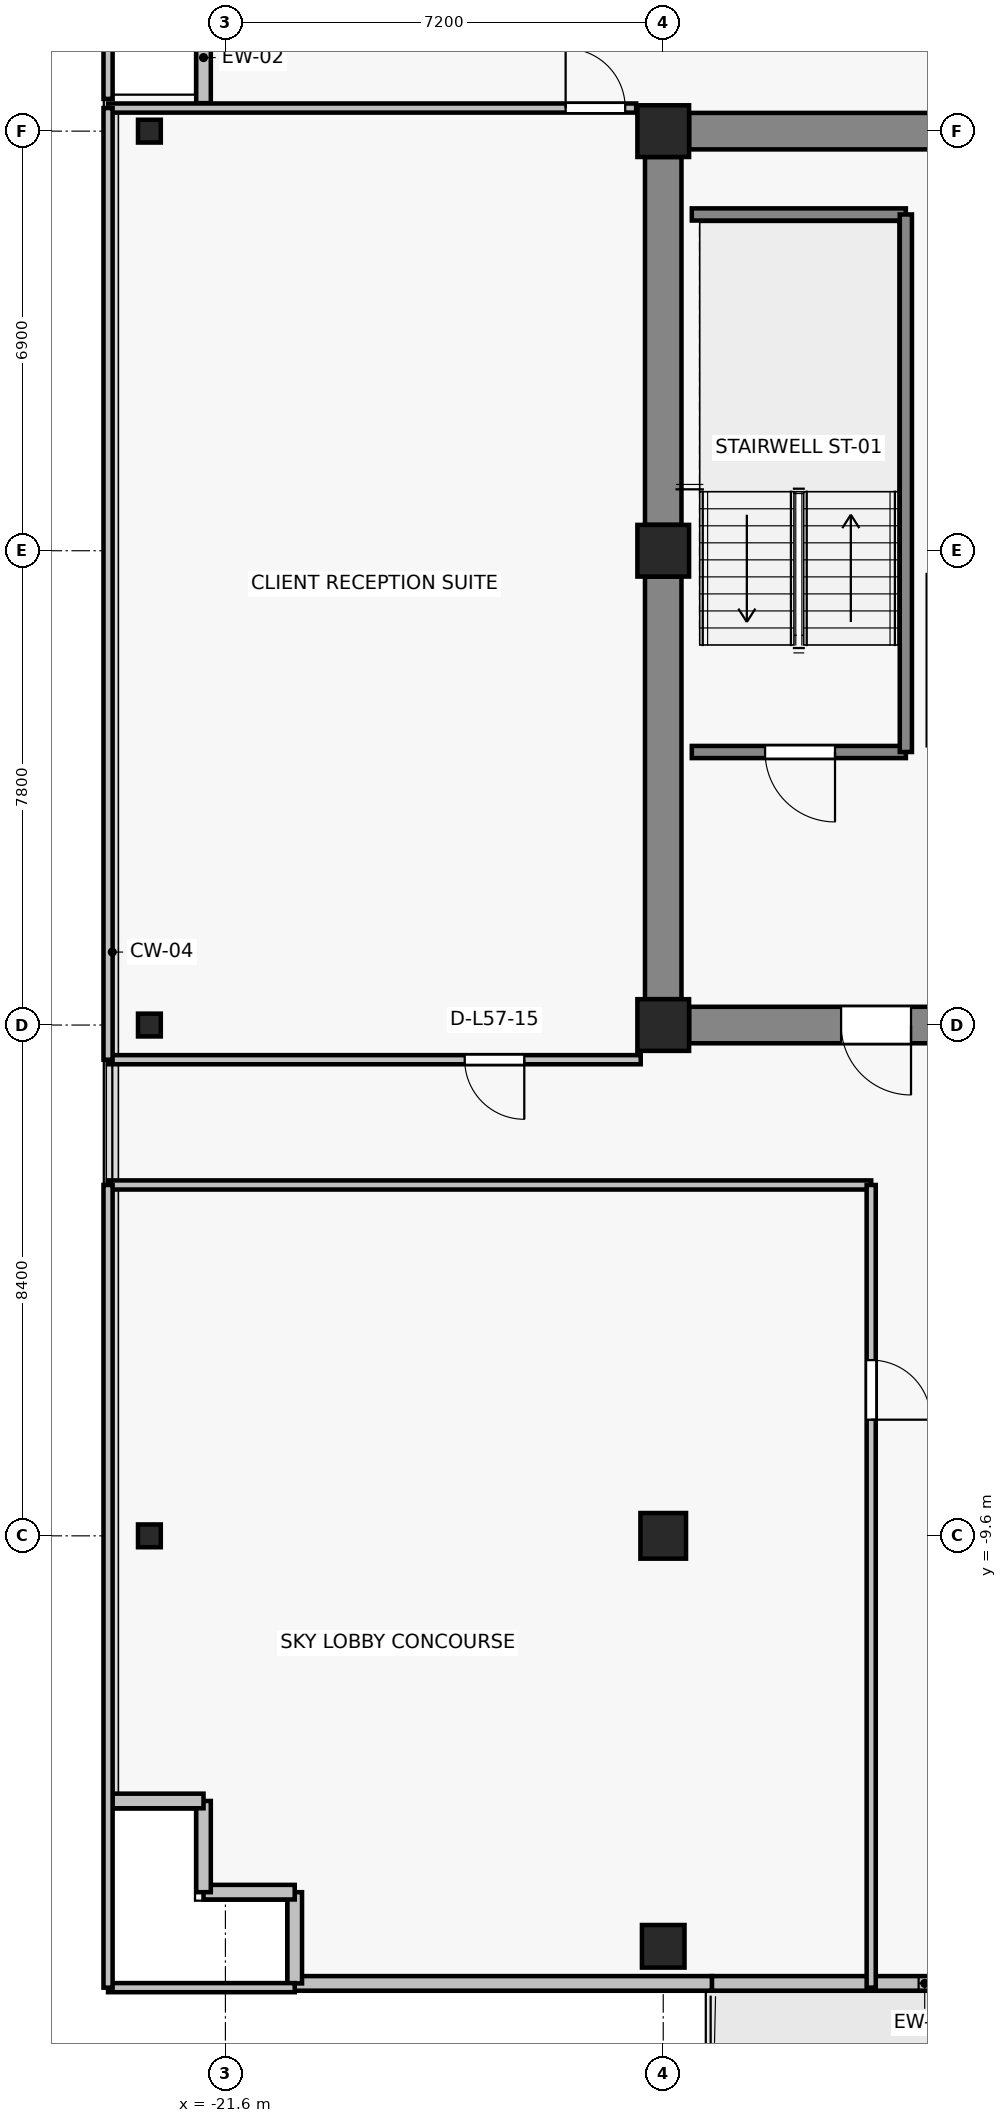
"""IFC4 building model, lengths in metres.
Left out: names, types, materials, properties, quantities, classifications, styles, units other than length and angle.
Written with IfcOpenShell. Run it as: python <this file> out.ifc"""

import sys

from ifc_helpers import new_model, si_unit, direction, frame, frame_2d, origin, origin_2d, place, context, subcontext, project, spatial, rectangle, i_section, extrude, source, transform, mapped, element, fill, save


model = new_model("IFC4")
c1 = context("Model", 3, precision=1e-05, world=origin(), true_north=direction((0.0, 1.0)))
c2 = subcontext(c1, "Body", "Model", "MODEL_VIEW")
j1 = project(units=[si_unit("LENGTHUNIT", "METRE"), si_unit("PLANEANGLEUNIT", "RADIAN")], contexts=[c1])
p1 = place(None, origin())
s1 = spatial("IfcSite", under=j1, at=p1, CompositionType="ELEMENT")
p2 = place(p1, origin())
s2 = spatial("IfcBuilding", under=s1, at=p2, CompositionType="ELEMENT")
p3 = place(p2, frame((0.0, 0.0, 205.6)))
s3 = spatial("IfcBuildingStorey", under=s2, at=p3, CompositionType="ELEMENT", Elevation=205.6)
for number, where, z_axis, x_axis in (
    (1, (-14.4, -1.2, 0.0), (0.0, 0.0, 1.0), (1.0, 0.0, 0.0)),
    (2, (-14.4, 6.6, 0.0), (0.0, 0.0, 1.0), (1.0, 0.0, 0.0)),
    (3, (-14.4, 13.5, 0.0), (0.0, 0.0, 1.0), (1.0, 0.0, 0.0)),
):
    element("IfcColumn", number, at=place(p3, frame(where, z_axis=z_axis, x_axis=x_axis)), inside=s3, PredefinedType="COLUMN", context=c2, shape_type="SweptSolid", body=[
        extrude(rectangle(XDim=0.85, YDim=0.85, at=origin_2d()), origin(), (0.0, 0.0, 1.0), 3.3),
    ])
p4 = place(p3, frame((-14.4, -9.6, 0.0), z_axis=(0.0, 0.0, 1.0), x_axis=(1.0, 0.0, 0.0)))
e4 = element("IfcColumn", 4, at=p4, inside=s3, PredefinedType="COLUMN", context=c2, shape_type="SweptSolid", body=[
    extrude(rectangle(XDim=0.75, YDim=0.75, at=origin_2d()), origin(), (0.0, 0.0, 1.0), 3.3),
])
p5 = place(p3, frame((-14.4, -16.35, 0.0), z_axis=(0.0, 0.0, 1.0), x_axis=(1.0, 0.0, 0.0)))
e5 = element("IfcColumn", 5, at=p5, inside=s3, PredefinedType="COLUMN", context=c2, shape_type="SweptSolid", body=[
    extrude(rectangle(XDim=0.7, YDim=0.7, at=origin_2d()), origin(), (0.0, 0.0, 1.0), 3.3),
])
for number, where, z_axis, x_axis in (
    (6, (-22.85, -9.6, 0.0), (0.0, 0.0, 1.0), (1.0, 0.0, 0.0)),
    (7, (-22.85, -1.2, 0.0), (0.0, 0.0, 1.0), (1.0, 0.0, 0.0)),
    (8, (-22.85, 13.5, 0.0), (0.0, 0.0, 1.0), (1.0, 0.0, 0.0)),
):
    element("IfcColumn", number, at=place(p3, frame(where, z_axis=z_axis, x_axis=x_axis)), inside=s3, PredefinedType="COLUMN", context=c2, shape_type="SweptSolid", body=[
        extrude(i_section(OverallWidth=0.375, OverallDepth=0.375, WebThickness=0.017, FlangeThickness=0.027, FilletRadius=0.015, at=origin_2d()), origin(), (0.0, 0.0, 1.0), 3.3),
    ])
p6 = place(p3, frame((-13.975, 13.5, 0.0), z_axis=(0.0, 0.0, 1.0), x_axis=(1.0, 0.0, 0.0)))
e9 = element("IfcWall", 9, at=p6, inside=s3, PredefinedType="SHEAR", context=c2, shape_type="SweptSolid", body=[
    extrude(rectangle(XDim=6.35, YDim=0.6, at=frame_2d((3.175, 0.0))), origin(), (0.0, 0.0, 1.0), 3.075),
])
p7 = place(p3, frame((-14.4, -0.775, 0.0), z_axis=(0.0, 0.0, 1.0), x_axis=(0.0, 1.0, 0.0)))
e10 = element("IfcWall", 10, at=p7, inside=s3, PredefinedType="SHEAR", context=c2, shape_type="SweptSolid", body=[
    extrude(rectangle(XDim=6.95, YDim=0.6, at=frame_2d((3.475, 0.0))), origin(), (0.0, 0.0, 1.0), 3.075),
])
p8 = place(p3, frame((-14.4, 7.025, 0.0), z_axis=(0.0, 0.0, 1.0), x_axis=(0.0, 1.0, 0.0)))
e11 = element("IfcWall", 11, at=p8, inside=s3, PredefinedType="SHEAR", context=c2, shape_type="SweptSolid", body=[
    extrude(rectangle(XDim=6.05, YDim=0.6, at=frame_2d((3.025, 0.0))), origin(), (0.0, 0.0, 1.0), 3.075),
])
p9 = place(p3, frame((-7.625, -1.2, 0.0), z_axis=(0.0, 0.0, 1.0), x_axis=(-1.0, 0.0, 0.0)))
e12 = element("IfcWall", 12, at=p9, inside=s3, PredefinedType="SHEAR", context=c2, shape_type="SweptSolid", body=[
    extrude(rectangle(XDim=6.35, YDim=0.6, at=frame_2d((3.175, 0.0))), origin(), (0.0, 0.0, 1.0), 3.075),
])
p10 = place(p9, frame((2.7, 0.0, 0.0)))
e13 = element("IfcOpeningElement", 13, at=p10, cuts=e12, PredefinedType="OPENING", context=c2, shape_type="SweptSolid", body=[
    extrude(rectangle(XDim=1.15, YDim=2.15, at=frame_2d((0.575, 1.075))), frame((0.0, 0.31, 0.0), z_axis=(0.0, -1.0, 0.0), x_axis=(1.0, 0.0, 0.0)), (0.0, 0.0, 1.0), 0.62),
])
p11 = place(p3, frame((-6.6, -16.96, 0.0), z_axis=(0.0, 0.0, 1.0), x_axis=(-1.0, 0.0, 0.0)))
e14 = element("IfcWall", 14, at=p11, inside=s3, PredefinedType="SOLIDWALL", context=c2, shape_type="SweptSolid", body=[
    extrude(rectangle(XDim=7.0, YDim=0.24, at=frame_2d((3.5, 0.0))), origin(), (0.0, 0.0, 1.0), 2.665),
])
p12 = place(p11, frame((1.05, 0.0, 0.0)))
e15 = element("IfcOpeningElement", 15, at=p12, cuts=e14, PredefinedType="OPENING", context=c2, shape_type="SweptSolid", body=[
    extrude(rectangle(XDim=1.0, YDim=2.2, at=frame_2d((0.5, 1.1))), frame((0.0, 0.13, 0.0), z_axis=(0.0, -1.0, 0.0), x_axis=(1.0, 0.0, 0.0)), (0.0, 0.0, 1.0), 0.26),
])
p13 = place(p11, frame((2.4, 0.0, 0.85)))
e16 = element("IfcOpeningElement", 16, at=p13, cuts=e14, PredefinedType="OPENING", context=c2, shape_type="SweptSolid", body=[
    extrude(rectangle(XDim=1.2, YDim=1.5, at=frame_2d((0.6, 0.75))), frame((0.0, 0.13, 0.0), z_axis=(0.0, -1.0, 0.0), x_axis=(1.0, 0.0, 0.0)), (0.0, 0.0, 1.0), 0.26),
])
p14 = place(p3, frame((-21.96, 15.46, 0.0), z_axis=(0.0, 0.0, 1.0), x_axis=(0.0, -1.0, 0.0)))
e17 = element("IfcWall", 17, at=p14, inside=s3, PredefinedType="SOLIDWALL", context=c2, shape_type="SweptSolid", body=[
    extrude(rectangle(XDim=1.5, YDim=0.24, at=frame_2d((0.75, 0.0))), origin(), (0.0, 0.0, 1.0), 3.075),
])
p15 = place(p3, frame((-20.46, -16.96, 0.0), z_axis=(0.0, 0.0, 1.0), x_axis=(1.0, 0.0, 0.0)))
e18 = element("IfcWall", 18, at=p15, inside=s3, PredefinedType="SOLIDWALL", context=c2, shape_type="SweptSolid", body=[
    extrude(rectangle(XDim=6.86, YDim=0.24, at=frame_2d((3.43, 0.0))), origin(), (0.0, 0.0, 1.0), 2.665),
])
for number, where, z_axis, x_axis in (
    (19, (-20.46, -15.46, 0.0), (0.0, 0.0, 1.0), (0.0, -1.0, 0.0)),
    (20, (-21.96, -15.46, 0.0), (0.0, 0.0, 1.0), (1.0, 0.0, 0.0)),
    (21, (-21.96, -13.96, 0.0), (0.0, 0.0, 1.0), (0.0, -1.0, 0.0)),
    (22, (-23.46, -13.96, 0.0), (0.0, 0.0, 1.0), (1.0, 0.0, 0.0)),
):
    element("IfcWall", number, at=place(p3, frame(where, z_axis=z_axis, x_axis=x_axis)), inside=s3, PredefinedType="SOLIDWALL", context=c2, shape_type="SweptSolid", body=[
        extrude(rectangle(XDim=1.5, YDim=0.24, at=frame_2d((0.75, 0.0))), origin(), (0.0, 0.0, 1.0), 3.075),
    ])
p16 = place(p3, frame((-10.41, 3.29, 0.0), z_axis=(0.0, 0.0, 1.0), x_axis=(-1.0, 0.0, 0.0)))
e23 = element("IfcWall", 23, at=p16, inside=s3, PredefinedType="SOLIDWALL", context=c2, shape_type="SweptSolid", body=[
    extrude(rectangle(XDim=3.52, YDim=0.2, at=frame_2d((1.76, 0.0))), origin(), (0.0, 0.0, 1.0), 3.075),
])
p17 = place(p16, frame((1.165, 0.0, 0.0)))
e24 = element("IfcOpeningElement", 24, at=p17, cuts=e23, PredefinedType="OPENING", context=c2, shape_type="SweptSolid", body=[
    extrude(rectangle(XDim=1.15, YDim=2.15, at=frame_2d((0.575, 1.075))), frame((0.0, 0.11, 0.0), z_axis=(0.0, -1.0, 0.0), x_axis=(1.0, 0.0, 0.0)), (0.0, 0.0, 1.0), 0.22),
])
p18 = place(p3, frame((-13.93, 12.13, 0.0), z_axis=(0.0, 0.0, 1.0), x_axis=(1.0, 0.0, 0.0)))
e25 = element("IfcWall", 25, at=p18, inside=s3, PredefinedType="SOLIDWALL", context=c2, shape_type="SweptSolid", body=[
    extrude(rectangle(XDim=3.52, YDim=0.2, at=frame_2d((1.76, 0.0))), origin(), (0.0, 0.0, 1.0), 3.075),
])
p19 = place(p3, frame((-10.41, 12.13, 0.0), z_axis=(0.0, 0.0, 1.0), x_axis=(0.0, -1.0, 0.0)))
e26 = element("IfcWall", 26, at=p19, inside=s3, PredefinedType="SOLIDWALL", context=c2, shape_type="SweptSolid", body=[
    extrude(rectangle(XDim=8.84, YDim=0.2, at=frame_2d((4.42, 0.0))), origin(), (0.0, 0.0, 1.0), 3.075),
])
p20 = place(p3, frame((-20.46, -17.03, 0.0), z_axis=(0.0, 0.0, 1.0), x_axis=(-1.0, 0.0, 0.0)))
e27 = element("IfcWall", 27, at=p20, inside=s3, PredefinedType="PARTITIONING", context=c2, shape_type="SweptSolid", body=[
    extrude(rectangle(XDim=3.07, YDim=0.15, at=frame_2d((1.535, 0.0))), origin(), (0.0, 0.0, 1.0), 2.665),
])
p21 = place(p3, frame((-23.53, -3.83, 0.0), z_axis=(0.0, 0.0, 1.0), x_axis=(1.0, 0.0, 0.0)))
e28 = element("IfcWall", 28, at=p21, inside=s3, PredefinedType="PARTITIONING", context=c2, shape_type="SweptSolid", body=[
    extrude(rectangle(XDim=12.55, YDim=0.15, at=frame_2d((6.275, 0.0))), origin(), (0.0, 0.0, 1.0), 2.615),
])
p22 = place(p3, frame((-23.53, -17.03, 0.0), z_axis=(0.0, 0.0, 1.0), x_axis=(0.0, 1.0, 0.0)))
e29 = element("IfcWall", 29, at=p22, inside=s3, PredefinedType="PARTITIONING", context=c2, shape_type="SweptSolid", body=[
    extrude(rectangle(XDim=13.2, YDim=0.15, at=frame_2d((6.6, 0.0))), origin(), (0.0, 0.0, 1.0), 2.665),
])
p23 = place(p3, frame((-10.98, -3.83, 0.0), z_axis=(0.0, 0.0, 1.0), x_axis=(0.0, -1.0, 0.0)))
e30 = element("IfcWall", 30, at=p23, inside=s3, PredefinedType="PARTITIONING", context=c2, shape_type="SweptSolid", body=[
    extrude(rectangle(XDim=13.2, YDim=0.15, at=frame_2d((6.6, 0.0))), origin(), (0.0, 0.0, 1.0), 2.615),
])
p24 = place(p23, frame((2.88, 0.0, 0.0)))
e31 = element("IfcOpeningElement", 31, at=p24, cuts=e30, PredefinedType="OPENING", context=c2, shape_type="SweptSolid", body=[
    extrude(rectangle(XDim=0.98, YDim=2.15, at=frame_2d((0.49, 1.075))), frame((0.0, 0.085, 0.0), z_axis=(0.0, -1.0, 0.0), x_axis=(1.0, 0.0, 0.0)), (0.0, 0.0, 1.0), 0.17),
])
p25 = place(p3, frame((-14.77, -1.77, 0.0), z_axis=(0.0, 0.0, 1.0), x_axis=(-1.0, 0.0, 0.0)))
e32 = element("IfcWall", 32, at=p25, inside=s3, PredefinedType="PARTITIONING", context=c2, shape_type="SweptSolid", body=[
    extrude(rectangle(XDim=8.76, YDim=0.15, at=frame_2d((4.38, 0.0))), origin(), (0.0, 0.0, 1.0), 2.765),
])
p26 = place(p25, frame((1.915, 0.0, 0.0)))
e33 = element("IfcOpeningElement", 33, at=p26, cuts=e32, PredefinedType="OPENING", context=c2, shape_type="SweptSolid", body=[
    extrude(rectangle(XDim=0.98, YDim=2.15, at=frame_2d((0.49, 1.075))), frame((0.0, 0.085, 0.0), z_axis=(0.0, -1.0, 0.0), x_axis=(1.0, 0.0, 0.0)), (0.0, 0.0, 1.0), 0.17),
])
p27 = place(p3, frame((-23.53, 13.88, 0.0), z_axis=(0.0, 0.0, 1.0), x_axis=(1.0, 0.0, 0.0)))
e34 = element("IfcWall", 34, at=p27, inside=s3, PredefinedType="PARTITIONING", context=c2, shape_type="SweptSolid", body=[
    extrude(rectangle(XDim=8.685, YDim=0.15, at=frame_2d((4.343, 0.0))), origin(), (0.0, 0.0, 1.0), 3.075),
])
p28 = place(p27, frame((7.525, 0.0, 0.0)))
e35 = element("IfcOpeningElement", 35, at=p28, cuts=e34, PredefinedType="OPENING", context=c2, shape_type="SweptSolid", body=[
    extrude(rectangle(XDim=0.98, YDim=2.15, at=frame_2d((0.49, 1.075))), frame((0.0, 0.085, 0.0), z_axis=(0.0, -1.0, 0.0), x_axis=(1.0, 0.0, 0.0)), (0.0, 0.0, 1.0), 0.17),
])
p29 = place(p3, frame((-23.53, -1.77, 0.0), z_axis=(0.0, 0.0, 1.0), x_axis=(0.0, 1.0, 0.0)))
e36 = element("IfcWall", 36, at=p29, inside=s3, PredefinedType="PARTITIONING", context=c2, shape_type="SweptSolid", body=[
    extrude(rectangle(XDim=15.65, YDim=0.15, at=frame_2d((7.825, 0.0))), origin(), (0.0, 0.0, 1.0), 3.075),
])
p30 = place(p3, frame((-23.53, 14.03, 0.0), z_axis=(0.0, 0.0, 1.0), x_axis=(0.0, 1.0, 0.0)))
e37 = element("IfcWall", 37, at=p30, inside=s3, PredefinedType="PARTITIONING", context=c2, shape_type="SweptSolid", body=[
    extrude(rectangle(XDim=3.0, YDim=0.15, at=frame_2d((1.5, 0.0))), origin(), (0.0, 0.0, 1.0), 3.075),
])
m1 = source(origin(), c2, "Body", "SweptSolid", [
    extrude(rectangle(XDim=1.2, YDim=1.5, at=frame_2d((0.6, 0.75))), frame((0.0, 0.03, 0.0), z_axis=(0.0, -1.0, 0.0), x_axis=(1.0, 0.0, 0.0)), (0.0, 0.0, 1.0), 0.06),
])
p31 = place(p13, origin())
e38 = element("IfcWindow", 38, at=p31, inside=s3, PartitioningType="SINGLE_PANEL", PredefinedType="WINDOW", context=c2, shape_type="MappedRepresentation", body=[
    mapped(m1, transform((0.0, 0.0, 0.0), x_axis=(1.0, 0.0, 0.0), y_axis=(0.0, 1.0, 0.0), z_axis=(0.0, 0.0, 1.0), scale=1.0)),
])
fill(e16, e38)
m2 = source(origin(), c2, "Body", "SweptSolid", [
    extrude(rectangle(XDim=1.15, YDim=2.15, at=frame_2d((0.575, 1.075))), frame((0.0, 0.025, 0.0), z_axis=(0.0, -1.0, 0.0), x_axis=(1.0, 0.0, 0.0)), (0.0, 0.0, 1.0), 0.05),
])
p32 = place(p17, origin())
e39 = element("IfcDoor", 39, at=p32, inside=s3, OperationType="SINGLE_SWING_LEFT", PredefinedType="DOOR", context=c2, shape_type="MappedRepresentation", body=[
    mapped(m2, transform((0.0, 0.0, 0.0), x_axis=(1.0, 0.0, 0.0), y_axis=(0.0, 1.0, 0.0), z_axis=(0.0, 0.0, 1.0), scale=1.0)),
])
fill(e24, e39)
p33 = place(p10, origin())
e40 = element("IfcDoor", 40, at=p33, inside=s3, OperationType="SINGLE_SWING_LEFT", PredefinedType="DOOR", context=c2, shape_type="MappedRepresentation", body=[
    mapped(m2, transform((0.0, 0.0, 0.0), x_axis=(1.0, 0.0, 0.0), y_axis=(0.0, 1.0, 0.0), z_axis=(0.0, 0.0, 1.0), scale=1.0)),
])
fill(e13, e40)
m3 = source(origin(), c2, "Body", "SweptSolid", [
    extrude(rectangle(XDim=0.98, YDim=2.15, at=frame_2d((0.49, 1.075))), frame((0.0, 0.025, 0.0), z_axis=(0.0, -1.0, 0.0), x_axis=(1.0, 0.0, 0.0)), (0.0, 0.0, 1.0), 0.05),
])
p34 = place(p24, origin())
e41 = element("IfcDoor", 41, at=p34, inside=s3, OperationType="SINGLE_SWING_RIGHT", PredefinedType="DOOR", context=c2, shape_type="MappedRepresentation", body=[
    mapped(m3, transform((0.0, 0.0, 0.0), x_axis=(1.0, 0.0, 0.0), y_axis=(0.0, 1.0, 0.0), z_axis=(0.0, 0.0, 1.0), scale=1.0)),
])
fill(e31, e41)
p35 = place(p26, origin())
e42 = element("IfcDoor", 42, at=p35, inside=s3, OperationType="SINGLE_SWING_LEFT", PredefinedType="DOOR", context=c2, shape_type="MappedRepresentation", body=[
    mapped(m3, transform((0.0, 0.0, 0.0), x_axis=(1.0, 0.0, 0.0), y_axis=(0.0, 1.0, 0.0), z_axis=(0.0, 0.0, 1.0), scale=1.0)),
])
fill(e33, e42)
p36 = place(p28, origin())
e43 = element("IfcDoor", 43, at=p36, inside=s3, OperationType="SINGLE_SWING_LEFT", PredefinedType="DOOR", context=c2, shape_type="MappedRepresentation", body=[
    mapped(m3, transform((0.0, 0.0, 0.0), x_axis=(1.0, 0.0, 0.0), y_axis=(0.0, 1.0, 0.0), z_axis=(0.0, 0.0, 1.0), scale=1.0)),
])
fill(e35, e43)
save(model, sys.argv[1])
